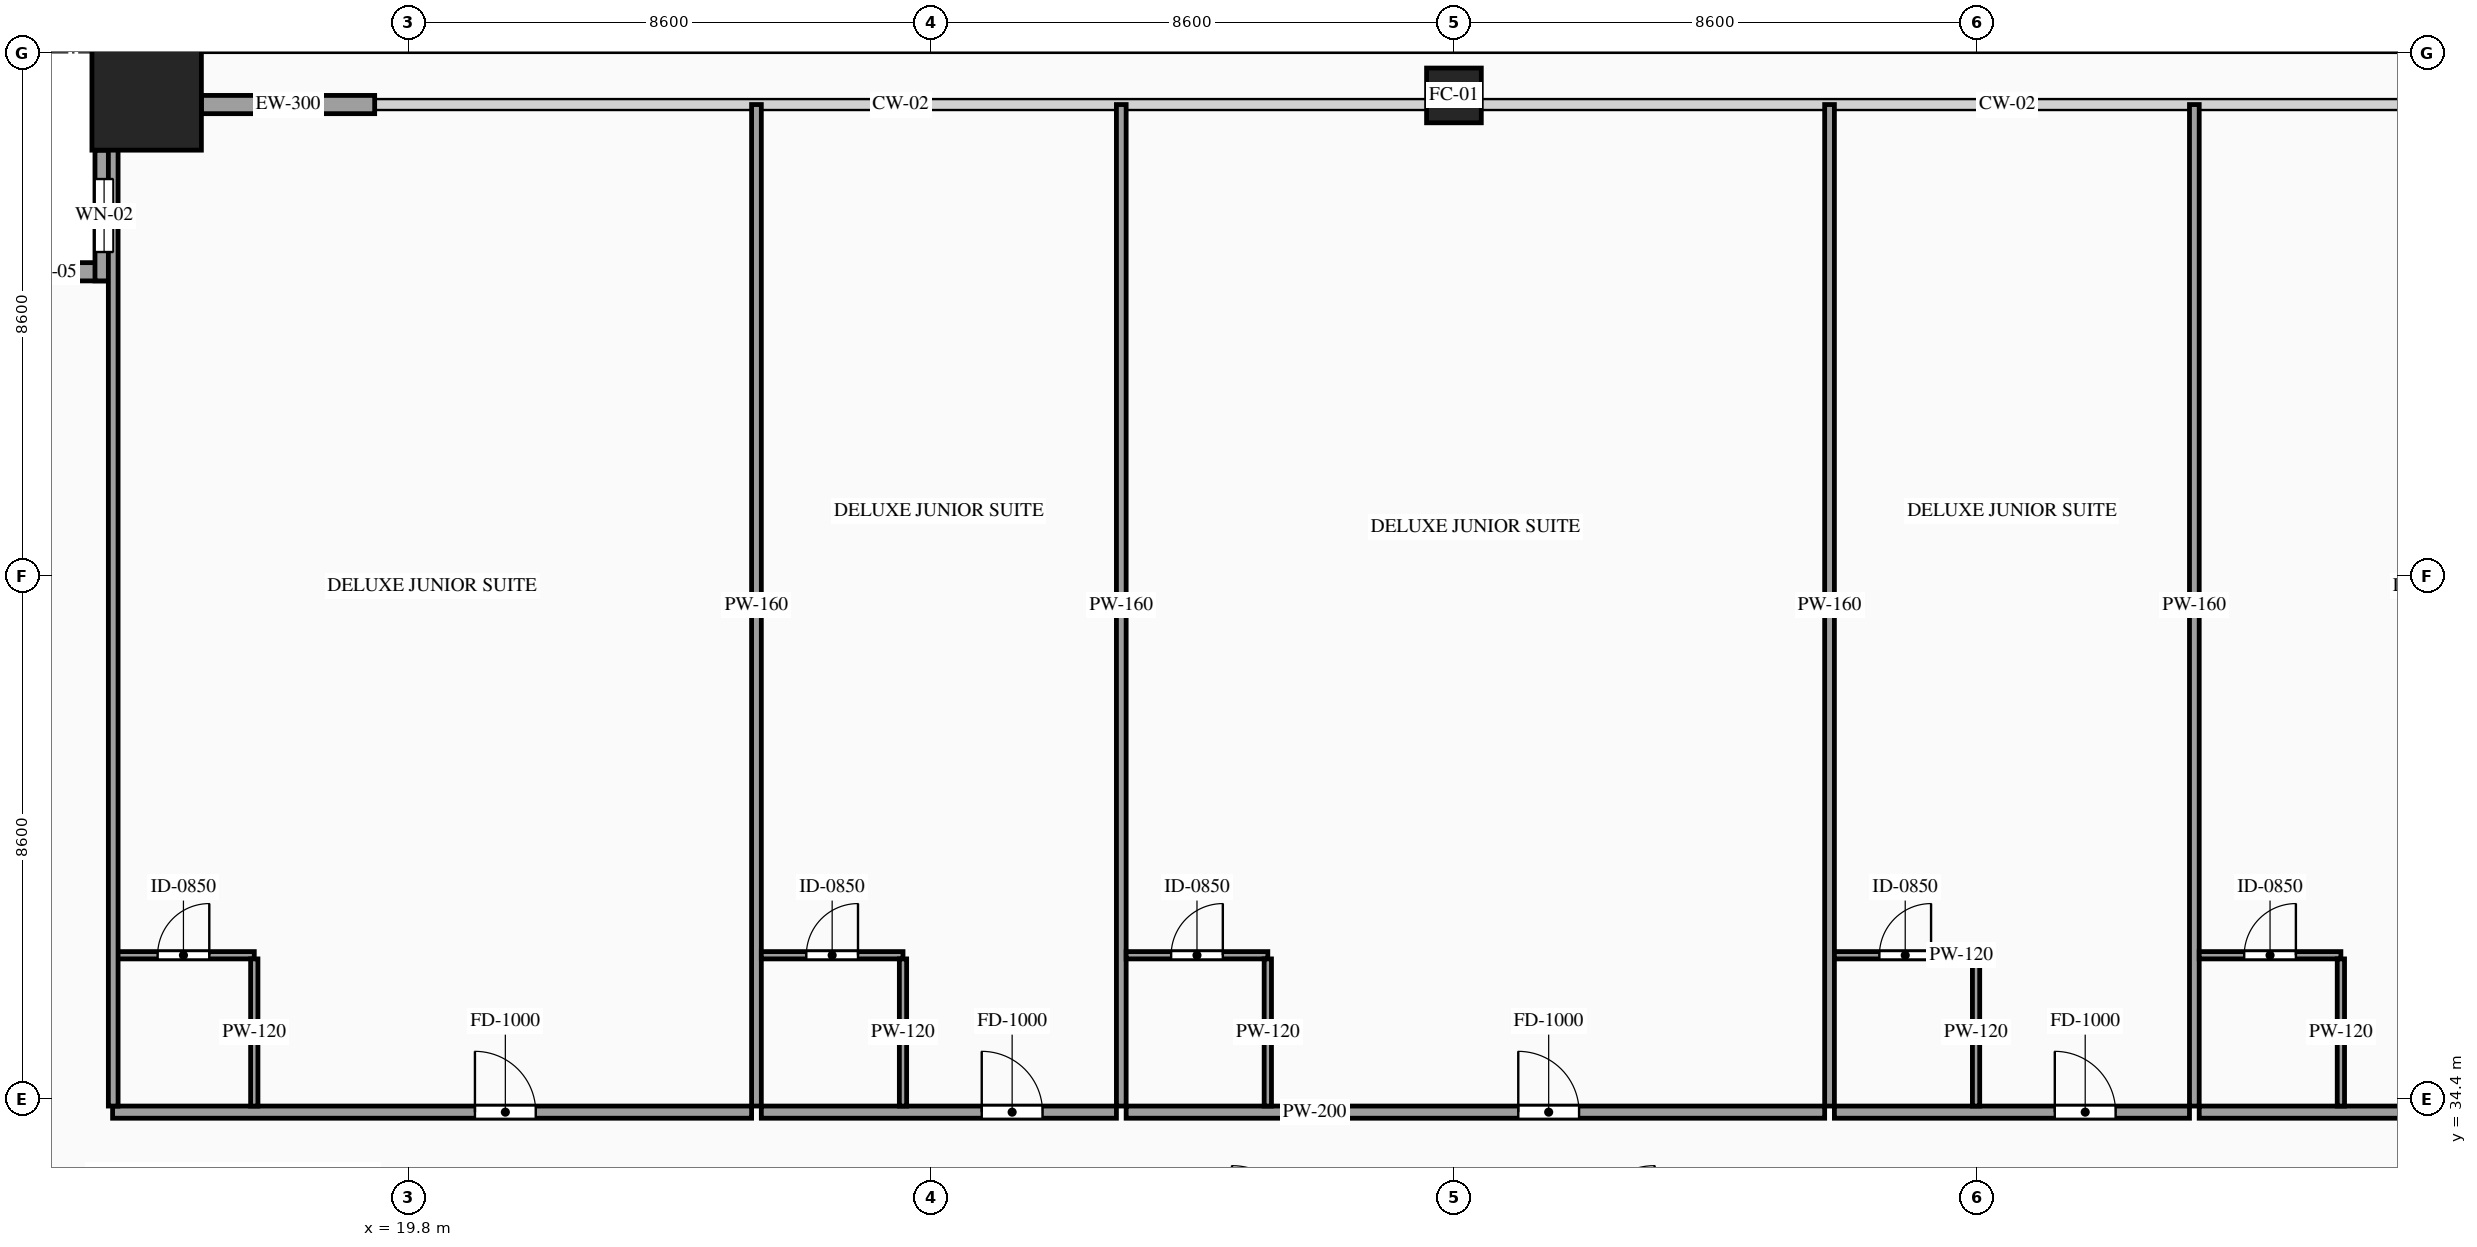
"""IFC4 building model, lengths in metres.
Left out: names, types, materials, properties, quantities, classifications, styles, units other than length and angle.
Written with IfcOpenShell. Run it as: python <this file> out.ifc"""

import sys

from ifc_helpers import new_model, si_unit, direction, frame, frame_2d, origin, origin_2d, place, context, subcontext, project, spatial, rectangle, hollow_rectangle, extrude, source, transform, mapped, element, fill, save


model = new_model("IFC4")
c1 = context("Model", 3, precision=1e-05, world=origin(), true_north=direction((0.0, 1.0)))
c2 = subcontext(c1, "Body", "Model", "MODEL_VIEW")
j1 = project(units=[si_unit("LENGTHUNIT", "METRE"), si_unit("PLANEANGLEUNIT", "RADIAN")], contexts=[c1])
p1 = place(None, origin())
s1 = spatial("IfcSite", under=j1, at=p1, CompositionType="ELEMENT")
p2 = place(p1, origin())
s2 = spatial("IfcBuilding", under=s1, at=p2, CompositionType="ELEMENT")
p3 = place(p2, frame((0.0, 0.0, 78.4)))
s3 = spatial("IfcBuildingStorey", under=s2, at=p3, CompositionType="ELEMENT", Elevation=78.4)
m1 = source(origin(), c2, "Body", "SweptSolid", [
    extrude(hollow_rectangle(XDim=1.8, YDim=1.8, WallThickness=0.08, at=origin_2d()), origin(), (0.0, 0.0, 1.0), 3.6),
])
p4 = place(p3, frame((15.5, 50.9, 0.0), z_axis=(0.0, 0.0, 1.0), x_axis=(1.0, 0.0, 0.0)))
e1 = element("IfcColumn", 1, at=p4, inside=s3, PredefinedType="COLUMN", context=c2, shape_type="MappedRepresentation", body=[
    mapped(m1, transform((0.0, 0.0, 0.0), scale=1.0)),
])
m2 = source(origin(), c2, "Body", "SweptSolid", [
    extrude(hollow_rectangle(XDim=0.9, YDim=0.9, WallThickness=0.042, at=origin_2d()), origin(), (0.0, 0.0, 1.0), 3.6),
])
p5 = place(p3, frame((37.0, 50.9, 0.0), z_axis=(0.0, 0.0, 1.0), x_axis=(1.0, 0.0, 0.0)))
e2 = element("IfcColumn", 2, at=p5, inside=s3, PredefinedType="COLUMN", context=c2, shape_type="MappedRepresentation", body=[
    mapped(m2, transform((0.0, 0.0, 0.0), scale=1.0)),
])
p6 = place(p3, frame((14.95, 48.0, 0.0), z_axis=(0.0, 0.0, 1.0), x_axis=(-1.0, 0.0, 0.0)))
e3 = element("IfcWall", 3, at=p6, inside=s3, PredefinedType="SOLIDWALL", context=c2, shape_type="SweptSolid", body=[
    extrude(rectangle(XDim=2.15, YDim=0.3, at=frame_2d((1.075, 0.0))), origin(), (0.0, 0.0, 1.0), 3.38),
])
p7 = place(p6, frame((0.625, 0.0, 0.85)))
e4 = element("IfcOpeningElement", 4, at=p7, cuts=e3, PredefinedType="OPENING", context=c2, shape_type="SweptSolid", body=[
    extrude(rectangle(XDim=0.9, YDim=1.5, at=frame_2d((0.45, 0.75))), frame((0.0, 0.165, 0.0), z_axis=(0.0, -1.0, 0.0), x_axis=(1.0, 0.0, 0.0)), (0.0, 0.0, 1.0), 0.33),
])
p8 = place(p3, frame((14.8, 50.0, 0.0), z_axis=(0.0, 0.0, 1.0), x_axis=(0.0, -1.0, 0.0)))
e5 = element("IfcWall", 5, at=p8, inside=s3, PredefinedType="SOLIDWALL", context=c2, shape_type="SweptSolid", body=[
    extrude(rectangle(XDim=2.15, YDim=0.3, at=frame_2d((1.075, 0.0))), origin(), (0.0, 0.0, 1.0), 3.38),
])
p9 = place(p8, frame((0.475, 0.0, 0.85)))
e6 = element("IfcOpeningElement", 6, at=p9, cuts=e5, PredefinedType="OPENING", context=c2, shape_type="SweptSolid", body=[
    extrude(rectangle(XDim=1.2, YDim=2.1, at=frame_2d((0.6, 1.05))), frame((0.0, 0.165, 0.0), z_axis=(0.0, -1.0, 0.0), x_axis=(1.0, 0.0, 0.0)), (0.0, 0.0, 1.0), 0.33),
])
m3 = source(origin(), c2, "Body", "SweptSolid", [
    extrude(rectangle(XDim=2.85, YDim=0.3, at=frame_2d((1.425, 0.0))), origin(), (0.0, 0.0, 1.0), 2.775),
])
p10 = place(p3, frame((16.4, 50.75, 0.0), z_axis=(0.0, 0.0, 1.0), x_axis=(1.0, 0.0, 0.0)))
e7 = element("IfcWall", 7, at=p10, inside=s3, PredefinedType="SOLIDWALL", context=c2, shape_type="MappedRepresentation", body=[
    mapped(m3, transform((0.0, 0.0, 0.0), scale=1.0)),
])
p11 = place(p3, frame((14.94, 34.18, 0.0), z_axis=(0.0, 0.0, 1.0), x_axis=(1.0, 0.0, 0.0)))
e8 = element("IfcWall", 8, at=p11, inside=s3, PredefinedType="PARTITIONING", context=c2, shape_type="SweptSolid", body=[
    extrude(rectangle(XDim=10.509, YDim=0.2, at=frame_2d((5.254, 0.0))), origin(), (0.0, 0.0, 1.0), 3.38),
])
p12 = place(p11, frame((5.959, 0.0, 0.0)))
e9 = element("IfcOpeningElement", 9, at=p12, cuts=e8, PredefinedType="OPENING", context=c2, shape_type="SweptSolid", body=[
    extrude(rectangle(XDim=1.0, YDim=2.2, at=frame_2d((0.5, 1.1))), frame((0.0, 0.115, 0.0), z_axis=(0.0, -1.0, 0.0), x_axis=(1.0, 0.0, 0.0)), (0.0, 0.0, 1.0), 0.23),
])
m4 = source(origin(), c2, "Body", "SweptSolid", [
    extrude(rectangle(XDim=16.47, YDim=0.16, at=frame_2d((8.235, 0.0))), origin(), (0.0, 0.0, 1.0), 3.38),
])
p13 = place(p3, frame((25.529, 34.28, 0.0), z_axis=(0.0, 0.0, 1.0), x_axis=(0.0, 1.0, 0.0)))
e10 = element("IfcWall", 10, at=p13, inside=s3, PredefinedType="PARTITIONING", context=c2, shape_type="MappedRepresentation", body=[
    mapped(m4, transform((0.0, 0.0, 0.0), scale=1.0)),
])
p14 = place(p3, frame((14.94, 36.76, 0.0), z_axis=(0.0, 0.0, 1.0), x_axis=(1.0, 0.0, 0.0)))
e11 = element("IfcWall", 11, at=p14, inside=s3, PredefinedType="PARTITIONING", context=c2, shape_type="SweptSolid", body=[
    extrude(rectangle(XDim=2.33, YDim=0.12, at=frame_2d((1.165, 0.0))), origin(), (0.0, 0.0, 1.0), 3.38),
])
p15 = place(p14, frame((0.74, 0.0, 0.0)))
e12 = element("IfcOpeningElement", 12, at=p15, cuts=e11, PredefinedType="OPENING", context=c2, shape_type="SweptSolid", body=[
    extrude(rectangle(XDim=0.85, YDim=2.1, at=frame_2d((0.425, 1.05))), frame((0.0, 0.075, 0.0), z_axis=(0.0, -1.0, 0.0), x_axis=(1.0, 0.0, 0.0)), (0.0, 0.0, 1.0), 0.15),
])
m5 = source(origin(), c2, "Body", "SweptSolid", [
    extrude(rectangle(XDim=2.42, YDim=0.12, at=frame_2d((1.21, 0.0))), origin(), (0.0, 0.0, 1.0), 3.38),
])
p16 = place(p3, frame((17.27, 34.28, 0.0), z_axis=(0.0, 0.0, 1.0), x_axis=(0.0, 1.0, 0.0)))
e13 = element("IfcWall", 13, at=p16, inside=s3, PredefinedType="PARTITIONING", context=c2, shape_type="MappedRepresentation", body=[
    mapped(m5, transform((0.0, 0.0, 0.0), scale=1.0)),
])
p17 = place(p3, frame((25.609, 34.18, 0.0), z_axis=(0.0, 0.0, 1.0), x_axis=(1.0, 0.0, 0.0)))
e14 = element("IfcWall", 14, at=p17, inside=s3, PredefinedType="PARTITIONING", context=c2, shape_type="SweptSolid", body=[
    extrude(rectangle(XDim=5.84, YDim=0.2, at=frame_2d((2.92, 0.0))), origin(), (0.0, 0.0, 1.0), 3.38),
])
p18 = place(p17, frame((3.625, 0.0, 0.0)))
e15 = element("IfcOpeningElement", 15, at=p18, cuts=e14, PredefinedType="OPENING", context=c2, shape_type="SweptSolid", body=[
    extrude(rectangle(XDim=1.0, YDim=2.2, at=frame_2d((0.5, 1.1))), frame((0.0, 0.115, 0.0), z_axis=(0.0, -1.0, 0.0), x_axis=(1.0, 0.0, 0.0)), (0.0, 0.0, 1.0), 0.23),
])
p19 = place(p3, frame((31.529, 34.28, 0.0), z_axis=(0.0, 0.0, 1.0), x_axis=(0.0, 1.0, 0.0)))
e16 = element("IfcWall", 16, at=p19, inside=s3, PredefinedType="PARTITIONING", context=c2, shape_type="MappedRepresentation", body=[
    mapped(m4, transform((0.0, 0.0, 0.0), scale=1.0)),
])
p20 = place(p3, frame((25.609, 36.76, 0.0), z_axis=(0.0, 0.0, 1.0), x_axis=(1.0, 0.0, 0.0)))
e17 = element("IfcWall", 17, at=p20, inside=s3, PredefinedType="PARTITIONING", context=c2, shape_type="SweptSolid", body=[
    extrude(rectangle(XDim=2.33, YDim=0.12, at=frame_2d((1.165, 0.0))), origin(), (0.0, 0.0, 1.0), 3.38),
])
p21 = place(p20, frame((0.74, 0.0, 0.0)))
e18 = element("IfcOpeningElement", 18, at=p21, cuts=e17, PredefinedType="OPENING", context=c2, shape_type="SweptSolid", body=[
    extrude(rectangle(XDim=0.85, YDim=2.1, at=frame_2d((0.425, 1.05))), frame((0.0, 0.075, 0.0), z_axis=(0.0, -1.0, 0.0), x_axis=(1.0, 0.0, 0.0)), (0.0, 0.0, 1.0), 0.15),
])
p22 = place(p3, frame((27.939, 34.28, 0.0), z_axis=(0.0, 0.0, 1.0), x_axis=(0.0, 1.0, 0.0)))
e19 = element("IfcWall", 19, at=p22, inside=s3, PredefinedType="PARTITIONING", context=c2, shape_type="MappedRepresentation", body=[
    mapped(m5, transform((0.0, 0.0, 0.0), scale=1.0)),
])
p23 = place(p3, frame((31.609, 34.18, 0.0), z_axis=(0.0, 0.0, 1.0), x_axis=(1.0, 0.0, 0.0)))
e20 = element("IfcWall", 20, at=p23, inside=s3, PredefinedType="PARTITIONING", context=c2, shape_type="SweptSolid", body=[
    extrude(rectangle(XDim=11.488, YDim=0.2, at=frame_2d((5.744, 0.0))), origin(), (0.0, 0.0, 1.0), 3.38),
])
p24 = place(p23, frame((6.449, 0.0, 0.0)))
e21 = element("IfcOpeningElement", 21, at=p24, cuts=e20, PredefinedType="OPENING", context=c2, shape_type="SweptSolid", body=[
    extrude(rectangle(XDim=1.0, YDim=2.2, at=frame_2d((0.5, 1.1))), frame((0.0, 0.115, 0.0), z_axis=(0.0, -1.0, 0.0), x_axis=(1.0, 0.0, 0.0)), (0.0, 0.0, 1.0), 0.23),
])
p25 = place(p3, frame((43.177, 34.28, 0.0), z_axis=(0.0, 0.0, 1.0), x_axis=(0.0, 1.0, 0.0)))
e22 = element("IfcWall", 22, at=p25, inside=s3, PredefinedType="PARTITIONING", context=c2, shape_type="MappedRepresentation", body=[
    mapped(m4, transform((0.0, 0.0, 0.0), scale=1.0)),
])
p26 = place(p3, frame((31.609, 36.76, 0.0), z_axis=(0.0, 0.0, 1.0), x_axis=(1.0, 0.0, 0.0)))
e23 = element("IfcWall", 23, at=p26, inside=s3, PredefinedType="PARTITIONING", context=c2, shape_type="SweptSolid", body=[
    extrude(rectangle(XDim=2.33, YDim=0.12, at=frame_2d((1.165, 0.0))), origin(), (0.0, 0.0, 1.0), 3.38),
])
p27 = place(p26, frame((0.74, 0.0, 0.0)))
e24 = element("IfcOpeningElement", 24, at=p27, cuts=e23, PredefinedType="OPENING", context=c2, shape_type="SweptSolid", body=[
    extrude(rectangle(XDim=0.85, YDim=2.1, at=frame_2d((0.425, 1.05))), frame((0.0, 0.075, 0.0), z_axis=(0.0, -1.0, 0.0), x_axis=(1.0, 0.0, 0.0)), (0.0, 0.0, 1.0), 0.15),
])
p28 = place(p3, frame((33.939, 34.28, 0.0), z_axis=(0.0, 0.0, 1.0), x_axis=(0.0, 1.0, 0.0)))
e25 = element("IfcWall", 25, at=p28, inside=s3, PredefinedType="PARTITIONING", context=c2, shape_type="MappedRepresentation", body=[
    mapped(m5, transform((0.0, 0.0, 0.0), scale=1.0)),
])
p29 = place(p3, frame((43.257, 34.18, 0.0), z_axis=(0.0, 0.0, 1.0), x_axis=(1.0, 0.0, 0.0)))
e26 = element("IfcWall", 26, at=p29, inside=s3, PredefinedType="PARTITIONING", context=c2, shape_type="SweptSolid", body=[
    extrude(rectangle(XDim=5.84, YDim=0.2, at=frame_2d((2.92, 0.0))), origin(), (0.0, 0.0, 1.0), 3.38),
])
p30 = place(p29, frame((3.625, 0.0, 0.0)))
e27 = element("IfcOpeningElement", 27, at=p30, cuts=e26, PredefinedType="OPENING", context=c2, shape_type="SweptSolid", body=[
    extrude(rectangle(XDim=1.0, YDim=2.2, at=frame_2d((0.5, 1.1))), frame((0.0, 0.115, 0.0), z_axis=(0.0, -1.0, 0.0), x_axis=(1.0, 0.0, 0.0)), (0.0, 0.0, 1.0), 0.23),
])
p31 = place(p3, frame((49.177, 34.28, 0.0), z_axis=(0.0, 0.0, 1.0), x_axis=(0.0, 1.0, 0.0)))
e28 = element("IfcWall", 28, at=p31, inside=s3, PredefinedType="PARTITIONING", context=c2, shape_type="MappedRepresentation", body=[
    mapped(m4, transform((0.0, 0.0, 0.0), scale=1.0)),
])
p32 = place(p3, frame((43.257, 36.76, 0.0), z_axis=(0.0, 0.0, 1.0), x_axis=(1.0, 0.0, 0.0)))
e29 = element("IfcWall", 29, at=p32, inside=s3, PredefinedType="PARTITIONING", context=c2, shape_type="SweptSolid", body=[
    extrude(rectangle(XDim=2.33, YDim=0.12, at=frame_2d((1.165, 0.0))), origin(), (0.0, 0.0, 1.0), 3.38),
])
p33 = place(p32, frame((0.74, 0.0, 0.0)))
e30 = element("IfcOpeningElement", 30, at=p33, cuts=e29, PredefinedType="OPENING", context=c2, shape_type="SweptSolid", body=[
    extrude(rectangle(XDim=0.85, YDim=2.1, at=frame_2d((0.425, 1.05))), frame((0.0, 0.075, 0.0), z_axis=(0.0, -1.0, 0.0), x_axis=(1.0, 0.0, 0.0)), (0.0, 0.0, 1.0), 0.15),
])
p34 = place(p3, frame((45.587, 34.28, 0.0), z_axis=(0.0, 0.0, 1.0), x_axis=(0.0, 1.0, 0.0)))
e31 = element("IfcWall", 31, at=p34, inside=s3, PredefinedType="PARTITIONING", context=c2, shape_type="MappedRepresentation", body=[
    mapped(m5, transform((0.0, 0.0, 0.0), scale=1.0)),
])
p35 = place(p3, frame((49.257, 34.18, 0.0), z_axis=(0.0, 0.0, 1.0), x_axis=(1.0, 0.0, 0.0)))
e32 = element("IfcWall", 32, at=p35, inside=s3, PredefinedType="PARTITIONING", context=c2, shape_type="SweptSolid", body=[
    extrude(rectangle(XDim=9.803, YDim=0.2, at=frame_2d((4.901, 0.0))), origin(), (0.0, 0.0, 1.0), 3.38),
])
p36 = place(p35, frame((5.607, 0.0, 0.0)))
e33 = element("IfcOpeningElement", 33, at=p36, cuts=e32, PredefinedType="OPENING", context=c2, shape_type="SweptSolid", body=[
    extrude(rectangle(XDim=1.0, YDim=2.2, at=frame_2d((0.5, 1.1))), frame((0.0, 0.115, 0.0), z_axis=(0.0, -1.0, 0.0), x_axis=(1.0, 0.0, 0.0)), (0.0, 0.0, 1.0), 0.23),
])
m6 = source(origin(), c2, "Body", "SweptSolid", [
    extrude(rectangle(XDim=16.32, YDim=0.16, at=frame_2d((8.16, 0.0))), origin(), (0.0, 0.0, 1.0), 3.38),
])
p37 = place(p3, frame((14.95, 34.28, 0.0), z_axis=(0.0, 0.0, 1.0), x_axis=(0.0, 1.0, 0.0)))
e34 = element("IfcWall", 34, at=p37, inside=s3, PredefinedType="PARTITIONING", context=c2, shape_type="MappedRepresentation", body=[
    mapped(m6, transform((0.0, 0.0, 0.0), scale=1.0)),
])
p38 = place(p3, frame((49.257, 36.76, 0.0), z_axis=(0.0, 0.0, 1.0), x_axis=(1.0, 0.0, 0.0)))
e35 = element("IfcWall", 35, at=p38, inside=s3, PredefinedType="PARTITIONING", context=c2, shape_type="SweptSolid", body=[
    extrude(rectangle(XDim=2.33, YDim=0.12, at=frame_2d((1.165, 0.0))), origin(), (0.0, 0.0, 1.0), 3.38),
])
p39 = place(p38, frame((0.74, 0.0, 0.0)))
e36 = element("IfcOpeningElement", 36, at=p39, cuts=e35, PredefinedType="OPENING", context=c2, shape_type="SweptSolid", body=[
    extrude(rectangle(XDim=0.85, YDim=2.1, at=frame_2d((0.425, 1.05))), frame((0.0, 0.075, 0.0), z_axis=(0.0, -1.0, 0.0), x_axis=(1.0, 0.0, 0.0)), (0.0, 0.0, 1.0), 0.15),
])
p40 = place(p3, frame((51.587, 34.28, 0.0), z_axis=(0.0, 0.0, 1.0), x_axis=(0.0, 1.0, 0.0)))
e37 = element("IfcWall", 37, at=p40, inside=s3, PredefinedType="PARTITIONING", context=c2, shape_type="MappedRepresentation", body=[
    mapped(m5, transform((0.0, 0.0, 0.0), scale=1.0)),
])
m7 = source(origin(), c2, "Body", "SweptSolid", [
    extrude(rectangle(XDim=0.9, YDim=1.5, at=frame_2d((0.45, 0.75))), frame((0.0, 0.03, 0.0), z_axis=(0.0, -1.0, 0.0), x_axis=(1.0, 0.0, 0.0)), (0.0, 0.0, 1.0), 0.06),
])
p41 = place(p7, origin())
e38 = element("IfcWindow", 38, at=p41, inside=s3, PartitioningType="SINGLE_PANEL", PredefinedType="WINDOW", context=c2, shape_type="MappedRepresentation", body=[
    mapped(m7, transform((0.0, 0.0, 0.0), scale=1.0)),
])
fill(e4, e38)
m8 = source(origin(), c2, "Body", "SweptSolid", [
    extrude(rectangle(XDim=1.2, YDim=2.1, at=frame_2d((0.6, 1.05))), frame((0.0, 0.03, 0.0), z_axis=(0.0, -1.0, 0.0), x_axis=(1.0, 0.0, 0.0)), (0.0, 0.0, 1.0), 0.06),
])
p42 = place(p9, origin())
e39 = element("IfcWindow", 39, at=p42, inside=s3, PartitioningType="SINGLE_PANEL", PredefinedType="WINDOW", context=c2, shape_type="MappedRepresentation", body=[
    mapped(m8, transform((0.0, 0.0, 0.0), scale=1.0)),
])
fill(e6, e39)
m9 = source(origin(), c2, "Body", "SweptSolid", [
    extrude(rectangle(XDim=1.0, YDim=2.2, at=frame_2d((0.5, 1.1))), frame((0.0, 0.025, 0.0), z_axis=(0.0, -1.0, 0.0), x_axis=(1.0, 0.0, 0.0)), (0.0, 0.0, 1.0), 0.05),
])
p43 = place(p12, origin())
e40 = element("IfcDoor", 40, at=p43, inside=s3, OperationType="SINGLE_SWING_LEFT", PredefinedType="DOOR", context=c2, shape_type="MappedRepresentation", body=[
    mapped(m9, transform((0.0, 0.0, 0.0), scale=1.0)),
])
fill(e9, e40)
m10 = source(origin(), c2, "Body", "SweptSolid", [
    extrude(rectangle(XDim=0.85, YDim=2.1, at=frame_2d((0.425, 1.05))), frame((0.0, 0.025, 0.0), z_axis=(0.0, -1.0, 0.0), x_axis=(1.0, 0.0, 0.0)), (0.0, 0.0, 1.0), 0.05),
])
p44 = place(p15, origin())
e41 = element("IfcDoor", 41, at=p44, inside=s3, OperationType="SINGLE_SWING_RIGHT", PredefinedType="DOOR", context=c2, shape_type="MappedRepresentation", body=[
    mapped(m10, transform((0.0, 0.0, 0.0), scale=1.0)),
])
fill(e12, e41)
p45 = place(p18, origin())
e42 = element("IfcDoor", 42, at=p45, inside=s3, OperationType="SINGLE_SWING_LEFT", PredefinedType="DOOR", context=c2, shape_type="MappedRepresentation", body=[
    mapped(m9, transform((0.0, 0.0, 0.0), scale=1.0)),
])
fill(e15, e42)
p46 = place(p21, origin())
e43 = element("IfcDoor", 43, at=p46, inside=s3, OperationType="SINGLE_SWING_RIGHT", PredefinedType="DOOR", context=c2, shape_type="MappedRepresentation", body=[
    mapped(m10, transform((0.0, 0.0, 0.0), scale=1.0)),
])
fill(e18, e43)
p47 = place(p24, origin())
e44 = element("IfcDoor", 44, at=p47, inside=s3, OperationType="SINGLE_SWING_LEFT", PredefinedType="DOOR", context=c2, shape_type="MappedRepresentation", body=[
    mapped(m9, transform((0.0, 0.0, 0.0), scale=1.0)),
])
fill(e21, e44)
p48 = place(p27, origin())
e45 = element("IfcDoor", 45, at=p48, inside=s3, OperationType="SINGLE_SWING_RIGHT", PredefinedType="DOOR", context=c2, shape_type="MappedRepresentation", body=[
    mapped(m10, transform((0.0, 0.0, 0.0), scale=1.0)),
])
fill(e24, e45)
p49 = place(p30, origin())
e46 = element("IfcDoor", 46, at=p49, inside=s3, OperationType="SINGLE_SWING_LEFT", PredefinedType="DOOR", context=c2, shape_type="MappedRepresentation", body=[
    mapped(m9, transform((0.0, 0.0, 0.0), scale=1.0)),
])
fill(e27, e46)
p50 = place(p33, origin())
e47 = element("IfcDoor", 47, at=p50, inside=s3, OperationType="SINGLE_SWING_RIGHT", PredefinedType="DOOR", context=c2, shape_type="MappedRepresentation", body=[
    mapped(m10, transform((0.0, 0.0, 0.0), scale=1.0)),
])
fill(e30, e47)
p51 = place(p39, origin())
e48 = element("IfcDoor", 48, at=p51, inside=s3, OperationType="SINGLE_SWING_RIGHT", PredefinedType="DOOR", context=c2, shape_type="MappedRepresentation", body=[
    mapped(m10, transform((0.0, 0.0, 0.0), scale=1.0)),
])
fill(e36, e48)
save(model, sys.argv[1])
